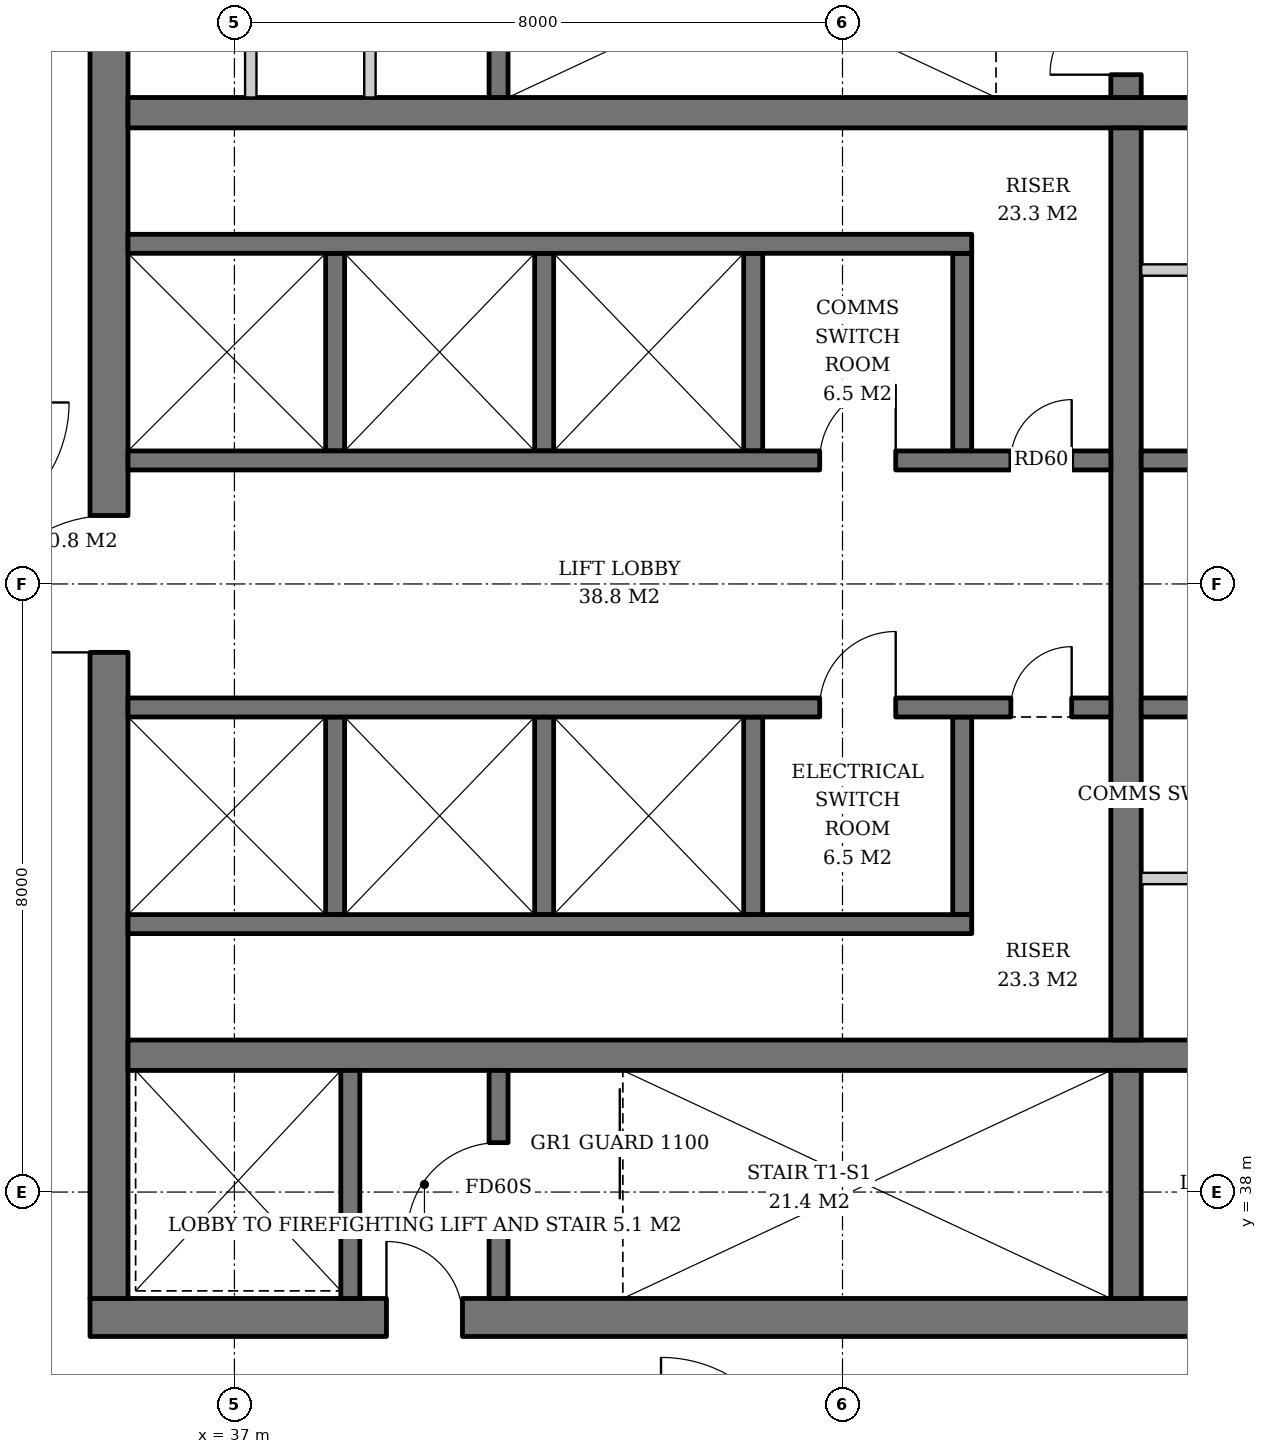
"""IFC4 building model, lengths in metres.
Left out: names, types, materials, properties, quantities, classifications, styles, units other than length and angle.
Written with IfcOpenShell. Run it as: python <this file> out.ifc"""

import sys

from ifc_helpers import new_model, si_unit, direction, frame, frame_2d, origin, origin_2d, place, context, subcontext, project, spatial, polyline, rectangle, outline, extrude, element, fill, save


model = new_model("IFC4")
c1 = context("Model", 3, precision=1e-05, world=origin(), true_north=direction((0.0, 1.0)))
c2 = subcontext(c1, "Body", "Model", "MODEL_VIEW")
j1 = project(units=[si_unit("LENGTHUNIT", "METRE"), si_unit("PLANEANGLEUNIT", "RADIAN")], contexts=[c1])
p1 = place(None, origin())
s1 = spatial("IfcSite", under=j1, at=p1, CompositionType="ELEMENT")
p2 = place(p1, origin())
s2 = spatial("IfcBuilding", under=s1, at=p2, CompositionType="ELEMENT")
p3 = place(p2, frame((0.0, 0.0, 290.8)))
s3 = spatial("IfcBuildingStorey", under=s2, at=p3, CompositionType="ELEMENT", Elevation=290.8)
p4 = place(p3, frame((33.722, 34.722, 0.007), z_axis=(0.036832736785, 0.036832736785, 0.998642428), x_axis=(-0.707106781187, 0.707106781187, 0.0)))
e1 = element("IfcColumn", 1, at=p4, inside=s3, PredefinedType="COLUMN", context=c2, shape_type="SweptSolid", body=[
    extrude(rectangle(XDim=1.6, YDim=1.6, at=origin_2d()), origin(), (0.0, 0.0, 1.0), 3.288),
])
p5 = place(p3, frame((35.1, 36.35, 0.0), z_axis=(0.0, 0.0, 1.0), x_axis=(1.0, 0.0, 0.0)))
e2 = element("IfcWall", 2, at=p5, inside=s3, PredefinedType="SHEAR", context=c2, shape_type="SweptSolid", body=[
    extrude(rectangle(XDim=19.8, YDim=0.5, at=frame_2d((9.9, 0.0))), origin(), (0.0, 0.0, 1.0), 3.67),
])
p6 = place(p5, frame((3.9, 0.0, 0.0)))
e3 = element("IfcOpeningElement", 3, at=p6, cuts=e2, PredefinedType="OPENING", context=c2, shape_type="SweptSolid", body=[
    extrude(rectangle(XDim=1.0, YDim=2.1, at=frame_2d((0.5, 1.05))), frame((0.0, 0.26, 0.0), z_axis=(0.0, -1.0, 0.0), x_axis=(1.0, 0.0, 0.0)), (0.0, 0.0, 1.0), 0.52),
])
p7 = place(p5, frame((15.35, 0.0, 0.0)))
e4 = element("IfcOpeningElement", 4, at=p7, cuts=e2, PredefinedType="OPENING", context=c2, shape_type="SweptSolid", body=[
    extrude(rectangle(XDim=1.0, YDim=2.1, at=frame_2d((0.5, 1.05))), frame((0.0, 0.26, 0.0), z_axis=(0.0, -1.0, 0.0), x_axis=(1.0, 0.0, 0.0)), (0.0, 0.0, 1.0), 0.52),
])
p8 = place(p3, frame((35.35, 36.6, 0.0), z_axis=(0.0, 0.0, 1.0), x_axis=(0.0, 1.0, 0.0)))
e5 = element("IfcWall", 5, at=p8, inside=s3, PredefinedType="SHEAR", context=c2, shape_type="SweptSolid", body=[
    extrude(outline(polyline([(0.0, 0.0), (18.8, 0.0), (18.8, 7.238), (0.0, 3.762), (0.0, 0.0)])), frame((0.0, 0.25, 0.0), z_axis=(0.0, -1.0, 0.0), x_axis=(1.0, 0.0, 0.0)), (0.0, 0.0, 1.0), 0.5),
])
p9 = place(p8, frame((8.5, 0.0, 0.0)))
e6 = element("IfcOpeningElement", 6, at=p9, cuts=e5, PredefinedType="OPENING", context=c2, shape_type="SweptSolid", body=[
    extrude(rectangle(XDim=1.8, YDim=2.4, at=frame_2d((0.9, 1.2))), frame((0.0, 0.26, 0.0), z_axis=(0.0, -1.0, 0.0), x_axis=(1.0, 0.0, 0.0)), (0.0, 0.0, 1.0), 0.52),
])
p10 = place(p3, frame((35.6, 39.8, 0.0), z_axis=(0.0, 0.0, 1.0), x_axis=(1.0, 0.0, 0.0)))
e7 = element("IfcWall", 7, at=p10, inside=s3, PredefinedType="SHEAR", context=c2, shape_type="SweptSolid", body=[
    extrude(rectangle(XDim=18.8, YDim=0.4, at=frame_2d((9.4, 0.0))), origin(), (0.0, 0.0, 1.0), 4.317),
])
p11 = place(p3, frame((35.6, 52.2, 0.0), z_axis=(0.0, 0.0, 1.0), x_axis=(1.0, 0.0, 0.0)))
e8 = element("IfcWall", 8, at=p11, inside=s3, PredefinedType="SHEAR", context=c2, shape_type="SweptSolid", body=[
    extrude(rectangle(XDim=18.8, YDim=0.4, at=frame_2d((9.4, 0.0))), origin(), (0.0, 0.0, 1.0), 6.609),
])
p12 = place(p3, frame((48.73, 36.6, 0.0), z_axis=(0.0, 0.0, 1.0), x_axis=(0.0, 1.0, 0.0)))
e9 = element("IfcWall", 9, at=p12, inside=s3, PredefinedType="SHEAR", context=c2, shape_type="SweptSolid", body=[
    extrude(outline(polyline([(0.0, 0.0), (3.0, 0.0), (3.0, 4.317), (0.0, 3.762), (0.0, 0.0)])), frame((0.0, 0.2, 0.0), z_axis=(0.0, -1.0, 0.0), x_axis=(1.0, 0.0, 0.0)), (0.0, 0.0, 1.0), 0.4),
])
p13 = place(p3, frame((48.73, 40.0, 0.0), z_axis=(0.0, 0.0, 1.0), x_axis=(0.0, 1.0, 0.0)))
e10 = element("IfcWall", 10, at=p13, inside=s3, PredefinedType="SHEAR", context=c2, shape_type="SweptSolid", body=[
    extrude(outline(polyline([(0.0, 0.0), (12.0, 0.0), (12.0, 6.609), (0.0, 4.391), (0.0, 0.0)])), frame((0.0, 0.2, 0.0), z_axis=(0.0, -1.0, 0.0), x_axis=(1.0, 0.0, 0.0)), (0.0, 0.0, 1.0), 0.4),
])
p14 = place(p3, frame((48.73, 52.4, 0.0), z_axis=(0.0, 0.0, 1.0), x_axis=(0.0, 1.0, 0.0)))
e11 = element("IfcWall", 11, at=p14, inside=s3, PredefinedType="SHEAR", context=c2, shape_type="SweptSolid", body=[
    extrude(outline(polyline([(0.0, 0.0), (3.0, 0.0), (3.0, 7.238), (0.0, 6.683), (0.0, 0.0)])), frame((0.0, 0.2, 0.0), z_axis=(0.0, -1.0, 0.0), x_axis=(1.0, 0.0, 0.0)), (0.0, 0.0, 1.0), 0.4),
])
p15 = place(p14, frame((0.3, 0.0, 0.0)))
e12 = element("IfcOpeningElement", 12, at=p15, cuts=e11, PredefinedType="OPENING", context=c2, shape_type="SweptSolid", body=[
    extrude(rectangle(XDim=1.0, YDim=2.1, at=frame_2d((0.5, 1.05))), frame((0.0, 0.21, 0.0), z_axis=(0.0, -1.0, 0.0), x_axis=(1.0, 0.0, 0.0)), (0.0, 0.0, 1.0), 0.42),
])
p16 = place(p3, frame((38.525, 36.6, 0.0), z_axis=(0.0, 0.0, 1.0), x_axis=(0.0, 1.0, 0.0)))
e13 = element("IfcWall", 13, at=p16, inside=s3, PredefinedType="SHEAR", context=c2, shape_type="SweptSolid", body=[
    extrude(outline(polyline([(0.0, 0.0), (3.0, 0.0), (3.0, 4.317), (0.0, 3.762), (0.0, 0.0)])), frame((0.0, 0.125, 0.0), z_axis=(0.0, -1.0, 0.0), x_axis=(1.0, 0.0, 0.0)), (0.0, 0.0, 1.0), 0.25),
])
p17 = place(p3, frame((40.475, 36.6, 0.0), z_axis=(0.0, 0.0, 1.0), x_axis=(0.0, 1.0, 0.0)))
e14 = element("IfcWall", 14, at=p17, inside=s3, PredefinedType="SHEAR", context=c2, shape_type="SweptSolid", body=[
    extrude(outline(polyline([(0.0, 0.0), (3.0, 0.0), (3.0, 4.317), (0.0, 3.762), (0.0, 0.0)])), frame((0.0, 0.125, 0.0), z_axis=(0.0, -1.0, 0.0), x_axis=(1.0, 0.0, 0.0)), (0.0, 0.0, 1.0), 0.25),
])
p18 = place(p17, frame((0.85, 0.0, 0.0)))
e15 = element("IfcOpeningElement", 15, at=p18, cuts=e14, PredefinedType="OPENING", context=c2, shape_type="SweptSolid", body=[
    extrude(rectangle(XDim=1.2, YDim=2.1, at=frame_2d((0.6, 1.05))), frame((0.0, 0.135, 0.0), z_axis=(0.0, -1.0, 0.0), x_axis=(1.0, 0.0, 0.0)), (0.0, 0.0, 1.0), 0.27),
])
p19 = place(p3, frame((40.475, 52.4, 0.0), z_axis=(0.0, 0.0, 1.0), x_axis=(0.0, 1.0, 0.0)))
e16 = element("IfcWall", 16, at=p19, inside=s3, PredefinedType="SHEAR", context=c2, shape_type="SweptSolid", body=[
    extrude(outline(polyline([(0.0, 0.0), (3.0, 0.0), (3.0, 7.238), (0.0, 6.683), (0.0, 0.0)])), frame((0.0, 0.125, 0.0), z_axis=(0.0, -1.0, 0.0), x_axis=(1.0, 0.0, 0.0)), (0.0, 0.0, 1.0), 0.25),
])
for number, where, z_axis, x_axis in (
    (17, (38.325, 47.75, 0.0), (0.0, 0.0, 1.0), (0.0, 1.0, 0.0)),
    (18, (41.075, 47.75, 0.0), (0.0, 0.0, 1.0), (0.0, 1.0, 0.0)),
    (19, (43.825, 47.75, 0.0), (0.0, 0.0, 1.0), (0.0, 1.0, 0.0)),
    (20, (46.575, 47.75, 0.0), (0.0, 0.0, 1.0), (0.0, 1.0, 0.0)),
):
    element("IfcWall", number, at=place(p3, frame(where, z_axis=z_axis, x_axis=x_axis)), inside=s3, PredefinedType="SHEAR", context=c2, shape_type="SweptSolid", body=[
        extrude(outline(polyline([(0.0, 0.0), (2.6, 0.0), (2.6, 6.304), (0.0, 5.823), (0.0, 0.0)])), frame((0.0, 0.125, 0.0), z_axis=(0.0, -1.0, 0.0), x_axis=(1.0, 0.0, 0.0)), (0.0, 0.0, 1.0), 0.25),
    ])
p20 = place(p3, frame((35.6, 50.475, 0.0), z_axis=(0.0, 0.0, 1.0), x_axis=(1.0, 0.0, 0.0)))
e21 = element("IfcWall", 21, at=p20, inside=s3, PredefinedType="SHEAR", context=c2, shape_type="SweptSolid", body=[
    extrude(rectangle(XDim=11.1, YDim=0.25, at=frame_2d((5.55, 0.0))), origin(), (0.0, 0.0, 1.0), 6.304),
])
p21 = place(p3, frame((35.6, 47.625, 0.0), z_axis=(0.0, 0.0, 1.0), x_axis=(1.0, 0.0, 0.0)))
e22 = element("IfcWall", 22, at=p21, inside=s3, PredefinedType="SHEAR", context=c2, shape_type="SweptSolid", body=[
    extrude(rectangle(XDim=12.93, YDim=0.25, at=frame_2d((6.465, 0.0))), origin(), (0.0, 0.0, 1.0), 5.777),
])
p22 = place(p21, frame((9.1, 0.0, 0.0)))
e23 = element("IfcOpeningElement", 23, at=p22, cuts=e22, PredefinedType="OPENING", context=c2, shape_type="SweptSolid", body=[
    extrude(rectangle(XDim=1.0, YDim=2.1, at=frame_2d((0.5, 1.05))), frame((0.0, 0.135, 0.0), z_axis=(0.0, -1.0, 0.0), x_axis=(1.0, 0.0, 0.0)), (0.0, 0.0, 1.0), 0.27),
])
p23 = place(p21, frame((11.615, 0.0, 0.0)))
e24 = element("IfcOpeningElement", 24, at=p23, cuts=e22, PredefinedType="OPENING", context=c2, shape_type="SweptSolid", body=[
    extrude(rectangle(XDim=0.8, YDim=2.0, at=frame_2d((0.4, 1.0))), frame((0.0, 0.135, 0.0), z_axis=(0.0, -1.0, 0.0), x_axis=(1.0, 0.0, 0.0)), (0.0, 0.0, 1.0), 0.27),
])
for number, where, z_axis, x_axis in (
    (25, (38.325, 44.25, 0.0), (0.0, 0.0, 1.0), (0.0, -1.0, 0.0)),
    (26, (41.075, 44.25, 0.0), (0.0, 0.0, 1.0), (0.0, -1.0, 0.0)),
    (27, (43.825, 44.25, 0.0), (0.0, 0.0, 1.0), (0.0, -1.0, 0.0)),
    (28, (46.575, 44.25, 0.0), (0.0, 0.0, 1.0), (0.0, -1.0, 0.0)),
):
    element("IfcWall", number, at=place(p3, frame(where, z_axis=z_axis, x_axis=x_axis)), inside=s3, PredefinedType="SHEAR", context=c2, shape_type="SweptSolid", body=[
        extrude(outline(polyline([(0.0, 0.0), (2.6, 0.0), (2.6, 4.696), (0.0, 5.177), (0.0, 0.0)])), frame((0.0, 0.125, 0.0), z_axis=(0.0, -1.0, 0.0), x_axis=(1.0, 0.0, 0.0)), (0.0, 0.0, 1.0), 0.25),
    ])
p24 = place(p3, frame((35.6, 41.525, 0.0), z_axis=(0.0, 0.0, 1.0), x_axis=(1.0, 0.0, 0.0)))
e29 = element("IfcWall", 29, at=p24, inside=s3, PredefinedType="SHEAR", context=c2, shape_type="SweptSolid", body=[
    extrude(rectangle(XDim=11.1, YDim=0.25, at=frame_2d((5.55, 0.0))), origin(), (0.0, 0.0, 1.0), 4.65),
])
p25 = place(p3, frame((35.6, 44.375, 0.0), z_axis=(0.0, 0.0, 1.0), x_axis=(1.0, 0.0, 0.0)))
e30 = element("IfcWall", 30, at=p25, inside=s3, PredefinedType="SHEAR", context=c2, shape_type="SweptSolid", body=[
    extrude(rectangle(XDim=12.93, YDim=0.25, at=frame_2d((6.465, 0.0))), origin(), (0.0, 0.0, 1.0), 5.177),
])
p26 = place(p25, frame((9.1, 0.0, 0.0)))
e31 = element("IfcOpeningElement", 31, at=p26, cuts=e30, PredefinedType="OPENING", context=c2, shape_type="SweptSolid", body=[
    extrude(rectangle(XDim=1.0, YDim=2.1, at=frame_2d((0.5, 1.05))), frame((0.0, 0.135, 0.0), z_axis=(0.0, -1.0, 0.0), x_axis=(1.0, 0.0, 0.0)), (0.0, 0.0, 1.0), 0.27),
])
p27 = place(p25, frame((11.615, 0.0, 0.0)))
e32 = element("IfcOpeningElement", 32, at=p27, cuts=e30, PredefinedType="OPENING", context=c2, shape_type="SweptSolid", body=[
    extrude(rectangle(XDim=0.8, YDim=2.0, at=frame_2d((0.4, 1.0))), frame((0.0, 0.135, 0.0), z_axis=(0.0, -1.0, 0.0), x_axis=(1.0, 0.0, 0.0)), (0.0, 0.0, 1.0), 0.27),
])
p28 = place(p3, frame((48.93, 47.625, 0.0), z_axis=(0.0, 0.0, 1.0), x_axis=(1.0, 0.0, 0.0)))
e33 = element("IfcWall", 33, at=p28, inside=s3, PredefinedType="SHEAR", context=c2, shape_type="SweptSolid", body=[
    extrude(rectangle(XDim=5.47, YDim=0.25, at=frame_2d((2.735, 0.0))), origin(), (0.0, 0.0, 1.0), 5.777),
])
p29 = place(p28, frame((0.78, 0.0, 0.0)))
e34 = element("IfcOpeningElement", 34, at=p29, cuts=e33, PredefinedType="OPENING", context=c2, shape_type="SweptSolid", body=[
    extrude(rectangle(XDim=1.0, YDim=2.1, at=frame_2d((0.5, 1.05))), frame((0.0, 0.135, 0.0), z_axis=(0.0, -1.0, 0.0), x_axis=(1.0, 0.0, 0.0)), (0.0, 0.0, 1.0), 0.27),
])
p30 = place(p28, frame((3.64, 0.0, 0.0)))
e35 = element("IfcOpeningElement", 35, at=p30, cuts=e33, PredefinedType="OPENING", context=c2, shape_type="SweptSolid", body=[
    extrude(rectangle(XDim=1.0, YDim=2.1, at=frame_2d((0.5, 1.05))), frame((0.0, 0.135, 0.0), z_axis=(0.0, -1.0, 0.0), x_axis=(1.0, 0.0, 0.0)), (0.0, 0.0, 1.0), 0.27),
])
p31 = place(p3, frame((48.93, 44.375, 0.0), z_axis=(0.0, 0.0, 1.0), x_axis=(1.0, 0.0, 0.0)))
e36 = element("IfcWall", 36, at=p31, inside=s3, PredefinedType="SHEAR", context=c2, shape_type="SweptSolid", body=[
    extrude(rectangle(XDim=5.47, YDim=0.25, at=frame_2d((2.735, 0.0))), origin(), (0.0, 0.0, 1.0), 5.177),
])
p32 = place(p31, frame((0.78, 0.0, 0.0)))
e37 = element("IfcOpeningElement", 37, at=p32, cuts=e36, PredefinedType="OPENING", context=c2, shape_type="SweptSolid", body=[
    extrude(rectangle(XDim=1.0, YDim=2.1, at=frame_2d((0.5, 1.05))), frame((0.0, 0.135, 0.0), z_axis=(0.0, -1.0, 0.0), x_axis=(1.0, 0.0, 0.0)), (0.0, 0.0, 1.0), 0.27),
])
p33 = place(p31, frame((3.64, 0.0, 0.0)))
e38 = element("IfcOpeningElement", 38, at=p33, cuts=e36, PredefinedType="OPENING", context=c2, shape_type="SweptSolid", body=[
    extrude(rectangle(XDim=1.0, YDim=2.1, at=frame_2d((0.5, 1.05))), frame((0.0, 0.135, 0.0), z_axis=(0.0, -1.0, 0.0), x_axis=(1.0, 0.0, 0.0)), (0.0, 0.0, 1.0), 0.27),
])
for number, where, z_axis, x_axis in (
    (39, (37.215, 52.4, 0.0), (0.0, 0.0, 1.0), (0.0, 1.0, 0.0)),
    (40, (38.782, 52.4, 0.0), (0.0, 0.0, 1.0), (0.0, 1.0, 0.0)),
):
    element("IfcWall", number, at=place(p3, frame(where, z_axis=z_axis, x_axis=x_axis)), inside=s3, PredefinedType="SOLIDWALL", context=c2, shape_type="SweptSolid", body=[
        extrude(outline(polyline([(0.0, 0.0), (3.0, 0.0), (3.0, 7.238), (0.0, 6.683), (0.0, 0.0)])), frame((0.0, 0.075, 0.0), z_axis=(0.0, -1.0, 0.0), x_axis=(1.0, 0.0, 0.0)), (0.0, 0.0, 1.0), 0.15),
    ])
p34 = place(p3, frame((48.93, 50.13, 0.0), z_axis=(0.0, 0.0, 1.0), x_axis=(1.0, 0.0, 0.0)))
e41 = element("IfcWall", 41, at=p34, inside=s3, PredefinedType="SOLIDWALL", context=c2, shape_type="SweptSolid", body=[
    extrude(rectangle(XDim=2.56, YDim=0.15, at=frame_2d((1.28, 0.0))), origin(), (0.0, 0.0, 1.0), 6.25),
])
p35 = place(p34, frame((0.78, 0.0, 0.0)))
e42 = element("IfcOpeningElement", 42, at=p35, cuts=e41, PredefinedType="OPENING", context=c2, shape_type="SweptSolid", body=[
    extrude(rectangle(XDim=1.0, YDim=2.1, at=frame_2d((0.5, 1.05))), frame((0.0, 0.085, 0.0), z_axis=(0.0, -1.0, 0.0), x_axis=(1.0, 0.0, 0.0)), (0.0, 0.0, 1.0), 0.17),
])
p36 = place(p3, frame((48.93, 42.125, 0.0), z_axis=(0.0, 0.0, 1.0), x_axis=(1.0, 0.0, 0.0)))
e43 = element("IfcWall", 43, at=p36, inside=s3, PredefinedType="SOLIDWALL", context=c2, shape_type="SweptSolid", body=[
    extrude(rectangle(XDim=2.56, YDim=0.15, at=frame_2d((1.28, 0.0))), origin(), (0.0, 0.0, 1.0), 4.77),
])
p37 = place(p36, frame((0.78, 0.0, 0.0)))
e44 = element("IfcOpeningElement", 44, at=p37, cuts=e43, PredefinedType="OPENING", context=c2, shape_type="SweptSolid", body=[
    extrude(rectangle(XDim=1.0, YDim=2.1, at=frame_2d((0.5, 1.05))), frame((0.0, 0.085, 0.0), z_axis=(0.0, -1.0, 0.0), x_axis=(1.0, 0.0, 0.0)), (0.0, 0.0, 1.0), 0.17),
])
p38 = place(p18, origin())
e45 = element("IfcDoor", 45, at=p38, inside=s3, OperationType="SINGLE_SWING_LEFT", PredefinedType="DOOR", context=c2, shape_type="SweptSolid", body=[
    extrude(rectangle(XDim=1.2, YDim=2.1, at=frame_2d((0.6, 1.05))), frame((0.0, 0.025, 0.0), z_axis=(0.0, -1.0, 0.0), x_axis=(1.0, 0.0, 0.0)), (0.0, 0.0, 1.0), 0.05),
])
fill(e15, e45)
p39 = place(p22, origin())
e46 = element("IfcDoor", 46, at=p39, inside=s3, OperationType="SINGLE_SWING_RIGHT", PredefinedType="DOOR", context=c2, shape_type="SweptSolid", body=[
    extrude(rectangle(XDim=1.0, YDim=2.1, at=frame_2d((0.5, 1.05))), frame((0.0, 0.025, 0.0), z_axis=(0.0, -1.0, 0.0), x_axis=(1.0, 0.0, 0.0)), (0.0, 0.0, 1.0), 0.05),
])
fill(e23, e46)
p40 = place(p23, origin())
e47 = element("IfcDoor", 47, at=p40, inside=s3, OperationType="SINGLE_SWING_RIGHT", PredefinedType="DOOR", context=c2, shape_type="SweptSolid", body=[
    extrude(rectangle(XDim=0.8, YDim=2.0, at=frame_2d((0.4, 1.0))), frame((0.0, 0.025, 0.0), z_axis=(0.0, -1.0, 0.0), x_axis=(1.0, 0.0, 0.0)), (0.0, 0.0, 1.0), 0.05),
])
fill(e24, e47)
p41 = place(p26, origin())
e48 = element("IfcDoor", 48, at=p41, inside=s3, OperationType="SINGLE_SWING_RIGHT", PredefinedType="DOOR", context=c2, shape_type="SweptSolid", body=[
    extrude(rectangle(XDim=1.0, YDim=2.1, at=frame_2d((0.5, 1.05))), frame((0.0, 0.025, 0.0), z_axis=(0.0, -1.0, 0.0), x_axis=(1.0, 0.0, 0.0)), (0.0, 0.0, 1.0), 0.05),
])
fill(e31, e48)
p42 = place(p27, origin())
e49 = element("IfcDoor", 49, at=p42, inside=s3, OperationType="SINGLE_SWING_RIGHT", PredefinedType="DOOR", context=c2, shape_type="SweptSolid", body=[
    extrude(rectangle(XDim=0.8, YDim=2.0, at=frame_2d((0.4, 1.0))), frame((0.0, 0.025, 0.0), z_axis=(0.0, -1.0, 0.0), x_axis=(1.0, 0.0, 0.0)), (0.0, 0.0, 1.0), 0.05),
])
fill(e32, e49)
p43 = place(p15, origin())
e50 = element("IfcDoor", 50, at=p43, inside=s3, OperationType="SINGLE_SWING_LEFT", PredefinedType="DOOR", context=c2, shape_type="SweptSolid", body=[
    extrude(rectangle(XDim=1.0, YDim=2.1, at=frame_2d((0.5, 1.05))), frame((0.0, 0.025, 0.0), z_axis=(0.0, -1.0, 0.0), x_axis=(1.0, 0.0, 0.0)), (0.0, 0.0, 1.0), 0.05),
])
fill(e12, e50)
p44 = place(p6, origin())
e51 = element("IfcDoor", 51, at=p44, inside=s3, OperationType="SINGLE_SWING_LEFT", PredefinedType="DOOR", context=c2, shape_type="SweptSolid", body=[
    extrude(rectangle(XDim=1.0, YDim=2.1, at=frame_2d((0.5, 1.05))), frame((0.0, 0.025, 0.0), z_axis=(0.0, -1.0, 0.0), x_axis=(1.0, 0.0, 0.0)), (0.0, 0.0, 1.0), 0.05),
])
fill(e3, e51)
p45 = place(p9, origin())
e52 = element("IfcDoor", 52, at=p45, inside=s3, OperationType="DOUBLE_DOOR_SINGLE_SWING", PredefinedType="DOOR", context=c2, shape_type="SweptSolid", body=[
    extrude(rectangle(XDim=1.8, YDim=2.4, at=frame_2d((0.9, 1.2))), frame((0.0, 0.025, 0.0), z_axis=(0.0, -1.0, 0.0), x_axis=(1.0, 0.0, 0.0)), (0.0, 0.0, 1.0), 0.05),
])
fill(e6, e52)
save(model, sys.argv[1])
